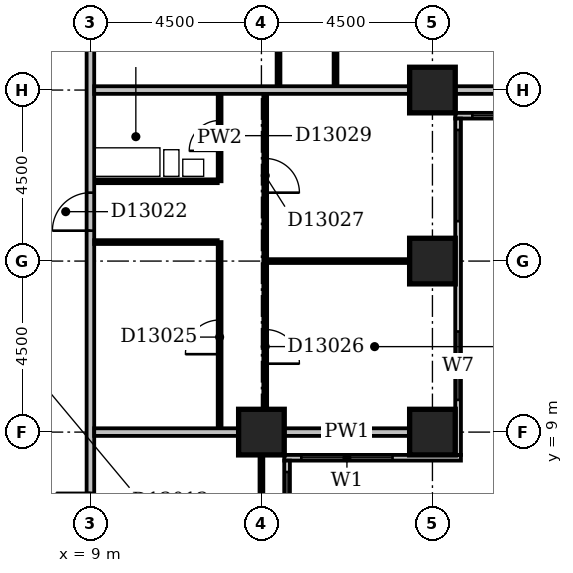
"""IFC4 building model, lengths in metres.
Left out: names, types, materials, properties, quantities, classifications, styles, units other than length and angle.
Written with IfcOpenShell. Run it as: python <this file> out.ifc"""

import sys

from ifc_helpers import new_model, si_unit, direction, frame, frame_2d, origin, origin_2d, place, context, subcontext, project, spatial, rectangle, extrude, element, fill, save


model = new_model("IFC4")
c1 = context("Model", 3, precision=1e-05, world=origin(), true_north=direction((0.0, 1.0)))
c2 = subcontext(c1, "Body", "Model", "MODEL_VIEW")
j1 = project(units=[si_unit("LENGTHUNIT", "METRE"), si_unit("PLANEANGLEUNIT", "RADIAN")], contexts=[c1])
p1 = place(None, origin())
s1 = spatial("IfcSite", under=j1, at=p1, CompositionType="ELEMENT")
p2 = place(p1, origin())
s2 = spatial("IfcBuilding", under=s1, at=p2, CompositionType="ELEMENT")
p3 = place(p2, frame((0.0, 0.0, 57.8)))
s3 = spatial("IfcBuildingStorey", under=s2, at=p3, CompositionType="ELEMENT", Elevation=57.8)
for number, where, z_axis, x_axis in (
    (1, (13.5, 9.0, -0.3), (0.0, 0.0, 1.0), (1.0, 0.0, 0.0)),
    (2, (18.0, 9.0, -0.3), (0.0, 0.0, 1.0), (1.0, 0.0, 0.0)),
    (3, (18.0, 13.5, -0.3), (0.0, 0.0, 1.0), (1.0, 0.0, 0.0)),
    (4, (18.0, 18.0, -0.3), (0.0, 0.0, 1.0), (1.0, 0.0, 0.0)),
):
    element("IfcColumn", number, at=place(p3, frame(where, z_axis=z_axis, x_axis=x_axis)), inside=s3, PredefinedType="COLUMN", context=c2, shape_type="SweptSolid", body=[
        extrude(rectangle(XDim=1.2, YDim=1.2, at=origin_2d()), origin(), (0.0, 0.0, 1.0), 3.6),
    ])
p4 = place(p3, frame((14.175, 3.9, 0.0), z_axis=(0.0, 0.0, 1.0), x_axis=(0.0, 1.0, 0.0)))
e5 = element("IfcWall", 5, at=p4, inside=s3, PredefinedType="STANDARD", context=c2, shape_type="SweptSolid", body=[
    extrude(rectangle(XDim=4.35, YDim=0.15, at=frame_2d((2.175, 0.0))), origin(), (0.0, 0.0, 1.0), 2.7),
])
p5 = place(p4, frame((1.65, 0.0, 0.6)))
e6 = element("IfcOpeningElement", 6, at=p5, cuts=e5, PredefinedType="OPENING", context=c2, shape_type="SweptSolid", body=[
    extrude(rectangle(XDim=2.4, YDim=1.8, at=frame_2d((1.2, 0.9))), frame((0.0, 0.087, 0.0), z_axis=(0.0, -1.0, 0.0), x_axis=(1.0, 0.0, 0.0)), (0.0, 0.0, 1.0), 0.174),
])
p6 = place(p3, frame((14.1, 8.325, 0.0), z_axis=(0.0, 0.0, 1.0), x_axis=(1.0, 0.0, 0.0)))
e7 = element("IfcWall", 7, at=p6, inside=s3, PredefinedType="STANDARD", context=c2, shape_type="SweptSolid", body=[
    extrude(rectangle(XDim=4.65, YDim=0.15, at=frame_2d((2.325, 0.0))), origin(), (0.0, 0.0, 1.0), 2.7),
])
p7 = place(p6, frame((0.45, 0.0, 0.6)))
e8 = element("IfcOpeningElement", 8, at=p7, cuts=e7, PredefinedType="OPENING", context=c2, shape_type="SweptSolid", body=[
    extrude(rectangle(XDim=2.4, YDim=1.8, at=frame_2d((1.2, 0.9))), frame((0.0, 0.087, 0.0), z_axis=(0.0, -1.0, 0.0), x_axis=(1.0, 0.0, 0.0)), (0.0, 0.0, 1.0), 0.174),
])
p8 = place(p3, frame((18.675, 8.4, 0.0), z_axis=(0.0, 0.0, 1.0), x_axis=(0.0, 1.0, 0.0)))
e9 = element("IfcWall", 9, at=p8, inside=s3, PredefinedType="STANDARD", context=c2, shape_type="SweptSolid", body=[
    extrude(rectangle(XDim=8.85, YDim=0.15, at=frame_2d((4.425, 0.0))), origin(), (0.0, 0.0, 1.0), 2.7),
])
p9 = place(p8, frame((1.447, 0.0, 0.6)))
e10 = element("IfcOpeningElement", 10, at=p9, cuts=e9, PredefinedType="OPENING", context=c2, shape_type="SweptSolid", body=[
    extrude(rectangle(XDim=1.8, YDim=1.8, at=frame_2d((0.9, 0.9))), frame((0.0, 0.087, 0.0), z_axis=(0.0, -1.0, 0.0), x_axis=(1.0, 0.0, 0.0)), (0.0, 0.0, 1.0), 0.174),
])
p10 = place(p8, frame((6.15, 0.0, 0.6)))
e11 = element("IfcOpeningElement", 11, at=p10, cuts=e9, PredefinedType="OPENING", context=c2, shape_type="SweptSolid", body=[
    extrude(rectangle(XDim=2.4, YDim=1.8, at=frame_2d((1.2, 0.9))), frame((0.0, 0.087, 0.0), z_axis=(0.0, -1.0, 0.0), x_axis=(1.0, 0.0, 0.0)), (0.0, 0.0, 1.0), 0.174),
])
p11 = place(p3, frame((18.6, 17.325, 0.0), z_axis=(0.0, 0.0, 1.0), x_axis=(1.0, 0.0, 0.0)))
e12 = element("IfcWall", 12, at=p11, inside=s3, PredefinedType="STANDARD", context=c2, shape_type="SweptSolid", body=[
    extrude(rectangle(XDim=4.65, YDim=0.15, at=frame_2d((2.325, 0.0))), origin(), (0.0, 0.0, 1.0), 2.7),
])
p12 = place(p11, frame((0.45, 0.0, 0.6)))
e13 = element("IfcOpeningElement", 13, at=p12, cuts=e12, PredefinedType="OPENING", context=c2, shape_type="SweptSolid", body=[
    extrude(rectangle(XDim=2.4, YDim=1.8, at=frame_2d((1.2, 0.9))), frame((0.0, 0.087, 0.0), z_axis=(0.0, -1.0, 0.0), x_axis=(1.0, 0.0, 0.0)), (0.0, 0.0, 1.0), 0.174),
])
p13 = place(p3, frame((9.0, 5.0, 0.0), z_axis=(0.0, 0.0, 1.0), x_axis=(0.0, 1.0, 0.0)))
e14 = element("IfcWall", 14, at=p13, inside=s3, PredefinedType="PARTITIONING", context=c2, shape_type="SweptSolid", body=[
    extrude(rectangle(XDim=44.5, YDim=0.2, at=frame_2d((22.25, 0.0))), origin(), (0.0, 0.0, 1.0), 3.3),
])
p14 = place(p13, frame((28.05, 0.0, 0.0)))
e15 = element("IfcOpeningElement", 15, at=p14, cuts=e14, PredefinedType="OPENING", context=c2, shape_type="SweptSolid", body=[
    extrude(rectangle(XDim=1.0, YDim=2.1, at=frame_2d((0.5, 1.05))), frame((0.0, 0.112, 0.0), z_axis=(0.0, -1.0, 0.0), x_axis=(1.0, 0.0, 0.0)), (0.0, 0.0, 1.0), 0.224),
])
p15 = place(p13, frame((23.95, 0.0, 0.0)))
e16 = element("IfcOpeningElement", 16, at=p15, cuts=e14, PredefinedType="OPENING", context=c2, shape_type="SweptSolid", body=[
    extrude(rectangle(XDim=1.0, YDim=2.1, at=frame_2d((0.5, 1.05))), frame((0.0, 0.112, 0.0), z_axis=(0.0, -1.0, 0.0), x_axis=(1.0, 0.0, 0.0)), (0.0, 0.0, 1.0), 0.224),
])
p16 = place(p13, frame((18.3, 0.0, 0.0)))
e17 = element("IfcOpeningElement", 17, at=p16, cuts=e14, PredefinedType="OPENING", context=c2, shape_type="SweptSolid", body=[
    extrude(rectangle(XDim=1.0, YDim=2.1, at=frame_2d((0.5, 1.05))), frame((0.0, 0.112, 0.0), z_axis=(0.0, -1.0, 0.0), x_axis=(1.0, 0.0, 0.0)), (0.0, 0.0, 1.0), 0.224),
])
p17 = place(p13, frame((9.3, 0.0, 0.0)))
e18 = element("IfcOpeningElement", 18, at=p17, cuts=e14, PredefinedType="OPENING", context=c2, shape_type="SweptSolid", body=[
    extrude(rectangle(XDim=1.0, YDim=2.1, at=frame_2d((0.5, 1.05))), frame((0.0, 0.112, 0.0), z_axis=(0.0, -1.0, 0.0), x_axis=(1.0, 0.0, 0.0)), (0.0, 0.0, 1.0), 0.224),
])
p18 = place(p13, frame((32.75, 0.0, 0.0)))
e19 = element("IfcOpeningElement", 19, at=p18, cuts=e14, PredefinedType="OPENING", context=c2, shape_type="SweptSolid", body=[
    extrude(rectangle(XDim=0.9, YDim=2.1, at=frame_2d((0.45, 1.05))), frame((0.0, 0.112, 0.0), z_axis=(0.0, -1.0, 0.0), x_axis=(1.0, 0.0, 0.0)), (0.0, 0.0, 1.0), 0.224),
])
p19 = place(p13, frame((1.5, 0.0, 0.0)))
e20 = element("IfcOpeningElement", 20, at=p19, cuts=e14, PredefinedType="OPENING", context=c2, shape_type="SweptSolid", body=[
    extrude(rectangle(XDim=0.9, YDim=2.1, at=frame_2d((0.45, 1.05))), frame((0.0, 0.112, 0.0), z_axis=(0.0, -1.0, 0.0), x_axis=(1.0, 0.0, 0.0)), (0.0, 0.0, 1.0), 0.224),
])
p20 = place(p3, frame((13.5, 5.1, 0.0), z_axis=(0.0, 0.0, 1.0), x_axis=(0.0, 1.0, 0.0)))
e21 = element("IfcWall", 21, at=p20, inside=s3, PredefinedType="PARTITIONING", context=c2, shape_type="SweptSolid", body=[
    extrude(rectangle(XDim=3.3, YDim=0.1, at=frame_2d((1.65, 0.0))), origin(), (0.0, 0.0, 1.0), 2.7),
])
p21 = place(p3, frame((9.1, 9.0, 0.0), z_axis=(0.0, 0.0, 1.0), x_axis=(1.0, 0.0, 0.0)))
e22 = element("IfcWall", 22, at=p21, inside=s3, PredefinedType="PARTITIONING", context=c2, shape_type="SweptSolid", body=[
    extrude(rectangle(XDim=3.8, YDim=0.2, at=frame_2d((1.9, 0.0))), origin(), (0.0, 0.0, 1.0), 3.3),
])
p22 = place(p3, frame((14.1, 9.0, 0.0), z_axis=(0.0, 0.0, 1.0), x_axis=(1.0, 0.0, 0.0)))
e23 = element("IfcWall", 23, at=p22, inside=s3, PredefinedType="PARTITIONING", context=c2, shape_type="SweptSolid", body=[
    extrude(rectangle(XDim=3.3, YDim=0.2, at=frame_2d((1.65, 0.0))), origin(), (0.0, 0.0, 1.0), 2.7),
])
p23 = place(p3, frame((12.4, 9.1, 0.0), z_axis=(0.0, 0.0, 1.0), x_axis=(0.0, 1.0, 0.0)))
e24 = element("IfcWall", 24, at=p23, inside=s3, PredefinedType="PARTITIONING", context=c2, shape_type="SweptSolid", body=[
    extrude(rectangle(XDim=4.9, YDim=0.1, at=frame_2d((2.45, 0.0))), origin(), (0.0, 0.0, 1.0), 3.3),
])
p24 = place(p23, frame((1.95, 0.0, 0.0)))
e25 = element("IfcOpeningElement", 25, at=p24, cuts=e24, PredefinedType="OPENING", context=c2, shape_type="SweptSolid", body=[
    extrude(rectangle(XDim=0.9, YDim=2.1, at=frame_2d((0.45, 1.05))), frame((0.0, 0.062, 0.0), z_axis=(0.0, -1.0, 0.0), x_axis=(1.0, 0.0, 0.0)), (0.0, 0.0, 1.0), 0.124),
])
p25 = place(p3, frame((13.6, 9.6, 0.0), z_axis=(0.0, 0.0, 1.0), x_axis=(0.0, 1.0, 0.0)))
e26 = element("IfcWall", 26, at=p25, inside=s3, PredefinedType="PARTITIONING", context=c2, shape_type="SweptSolid", body=[
    extrude(rectangle(XDim=8.3, YDim=0.1, at=frame_2d((4.15, 0.0))), origin(), (0.0, 0.0, 1.0), 3.3),
])
p26 = place(p25, frame((1.2, 0.0, 0.0)))
e27 = element("IfcOpeningElement", 27, at=p26, cuts=e26, PredefinedType="OPENING", context=c2, shape_type="SweptSolid", body=[
    extrude(rectangle(XDim=0.9, YDim=2.1, at=frame_2d((0.45, 1.05))), frame((0.0, 0.062, 0.0), z_axis=(0.0, -1.0, 0.0), x_axis=(1.0, 0.0, 0.0)), (0.0, 0.0, 1.0), 0.124),
])
p27 = place(p25, frame((5.7, 0.0, 0.0)))
e28 = element("IfcOpeningElement", 28, at=p27, cuts=e26, PredefinedType="OPENING", context=c2, shape_type="SweptSolid", body=[
    extrude(rectangle(XDim=0.9, YDim=2.1, at=frame_2d((0.45, 1.05))), frame((0.0, 0.062, 0.0), z_axis=(0.0, -1.0, 0.0), x_axis=(1.0, 0.0, 0.0)), (0.0, 0.0, 1.0), 0.124),
])
p28 = place(p3, frame((13.65, 13.5, 0.0), z_axis=(0.0, 0.0, 1.0), x_axis=(1.0, 0.0, 0.0)))
e29 = element("IfcWall", 29, at=p28, inside=s3, PredefinedType="PARTITIONING", context=c2, shape_type="SweptSolid", body=[
    extrude(rectangle(XDim=3.75, YDim=0.1, at=frame_2d((1.875, 0.0))), origin(), (0.0, 0.0, 1.0), 3.3),
])
p29 = place(p3, frame((9.1, 14.0, 0.0), z_axis=(0.0, 0.0, 1.0), x_axis=(1.0, 0.0, 0.0)))
e30 = element("IfcWall", 30, at=p29, inside=s3, PredefinedType="PARTITIONING", context=c2, shape_type="SweptSolid", body=[
    extrude(rectangle(XDim=3.25, YDim=0.1, at=frame_2d((1.625, 0.0))), origin(), (0.0, 0.0, 1.0), 3.3),
])
p30 = place(p3, frame((9.1, 15.6, 0.0), z_axis=(0.0, 0.0, 1.0), x_axis=(1.0, 0.0, 0.0)))
e31 = element("IfcWall", 31, at=p30, inside=s3, PredefinedType="PLUMBINGWALL", context=c2, shape_type="SweptSolid", body=[
    extrude(rectangle(XDim=3.25, YDim=0.1, at=frame_2d((1.625, 0.0))), origin(), (0.0, 0.0, 1.0), 3.3),
])
p31 = place(p3, frame((12.4, 15.6, 0.0), z_axis=(0.0, 0.0, 1.0), x_axis=(0.0, 1.0, 0.0)))
e32 = element("IfcWall", 32, at=p31, inside=s3, PredefinedType="PARTITIONING", context=c2, shape_type="SweptSolid", body=[
    extrude(rectangle(XDim=2.3, YDim=0.1, at=frame_2d((1.15, 0.0))), origin(), (0.0, 0.0, 1.0), 3.3),
])
p32 = place(p31, frame((0.8, 0.0, 0.0)))
e33 = element("IfcOpeningElement", 33, at=p32, cuts=e32, PredefinedType="OPENING", context=c2, shape_type="SweptSolid", body=[
    extrude(rectangle(XDim=0.8, YDim=2.1, at=frame_2d((0.4, 1.05))), frame((0.0, 0.062, 0.0), z_axis=(0.0, -1.0, 0.0), x_axis=(1.0, 0.0, 0.0)), (0.0, 0.0, 1.0), 0.124),
])
p33 = place(p3, frame((9.1, 18.0, 0.0), z_axis=(0.0, 0.0, 1.0), x_axis=(1.0, 0.0, 0.0)))
e34 = element("IfcWall", 34, at=p33, inside=s3, PredefinedType="PARTITIONING", context=c2, shape_type="SweptSolid", body=[
    extrude(rectangle(XDim=8.3, YDim=0.2, at=frame_2d((4.15, 0.0))), origin(), (0.0, 0.0, 1.0), 2.6),
])
p34 = place(p3, frame((18.6, 18.0, 0.0), z_axis=(0.0, 0.0, 1.0), x_axis=(1.0, 0.0, 0.0)))
e35 = element("IfcWall", 35, at=p34, inside=s3, PredefinedType="PARTITIONING", context=c2, shape_type="SweptSolid", body=[
    extrude(rectangle(XDim=3.3, YDim=0.2, at=frame_2d((1.65, 0.0))), origin(), (0.0, 0.0, 1.0), 2.7),
])
p35 = place(p3, frame((13.95, 18.1, 0.0), z_axis=(0.0, 0.0, 1.0), x_axis=(0.0, 1.0, 0.0)))
e36 = element("IfcWall", 36, at=p35, inside=s3, PredefinedType="PARTITIONING", context=c2, shape_type="SweptSolid", body=[
    extrude(rectangle(XDim=4.9, YDim=0.1, at=frame_2d((2.45, 0.0))), origin(), (0.0, 0.0, 1.0), 3.3),
])
p36 = place(p35, frame((1.95, 0.0, 0.0)))
e37 = element("IfcOpeningElement", 37, at=p36, cuts=e36, PredefinedType="OPENING", context=c2, shape_type="SweptSolid", body=[
    extrude(rectangle(XDim=0.9, YDim=2.1, at=frame_2d((0.45, 1.05))), frame((0.0, 0.062, 0.0), z_axis=(0.0, -1.0, 0.0), x_axis=(1.0, 0.0, 0.0)), (0.0, 0.0, 1.0), 0.124),
])
p37 = place(p3, frame((15.45, 18.1, 0.0), z_axis=(0.0, 0.0, 1.0), x_axis=(0.0, 1.0, 0.0)))
e38 = element("IfcWall", 38, at=p37, inside=s3, PredefinedType="PARTITIONING", context=c2, shape_type="SweptSolid", body=[
    extrude(rectangle(XDim=8.8, YDim=0.1, at=frame_2d((4.4, 0.0))), origin(), (0.0, 0.0, 1.0), 3.3),
])
p38 = place(p37, frame((1.7, 0.0, 0.0)))
e39 = element("IfcOpeningElement", 39, at=p38, cuts=e38, PredefinedType="OPENING", context=c2, shape_type="SweptSolid", body=[
    extrude(rectangle(XDim=0.9, YDim=2.1, at=frame_2d((0.45, 1.05))), frame((0.0, 0.062, 0.0), z_axis=(0.0, -1.0, 0.0), x_axis=(1.0, 0.0, 0.0)), (0.0, 0.0, 1.0), 0.124),
])
p39 = place(p37, frame((5.05, 0.0, 0.0)))
e40 = element("IfcOpeningElement", 40, at=p39, cuts=e38, PredefinedType="OPENING", context=c2, shape_type="SweptSolid", body=[
    extrude(rectangle(XDim=0.9, YDim=2.1, at=frame_2d((0.45, 1.05))), frame((0.0, 0.062, 0.0), z_axis=(0.0, -1.0, 0.0), x_axis=(1.0, 0.0, 0.0)), (0.0, 0.0, 1.0), 0.124),
])
p40 = place(p5, origin())
e41 = element("IfcWindow", 41, at=p40, inside=s3, PartitioningType="SINGLE_PANEL", PredefinedType="WINDOW", context=c2, shape_type="SweptSolid", body=[
    extrude(rectangle(XDim=2.4, YDim=1.8, at=frame_2d((1.2, 0.9))), frame((0.0, 0.03, 0.0), z_axis=(0.0, -1.0, 0.0), x_axis=(1.0, 0.0, 0.0)), (0.0, 0.0, 1.0), 0.06),
])
fill(e6, e41)
p41 = place(p7, origin())
e42 = element("IfcWindow", 42, at=p41, inside=s3, PartitioningType="SINGLE_PANEL", PredefinedType="WINDOW", context=c2, shape_type="SweptSolid", body=[
    extrude(rectangle(XDim=2.4, YDim=1.8, at=frame_2d((1.2, 0.9))), frame((0.0, 0.03, 0.0), z_axis=(0.0, -1.0, 0.0), x_axis=(1.0, 0.0, 0.0)), (0.0, 0.0, 1.0), 0.06),
])
fill(e8, e42)
p42 = place(p9, origin())
e43 = element("IfcWindow", 43, at=p42, inside=s3, PartitioningType="SINGLE_PANEL", PredefinedType="WINDOW", context=c2, shape_type="SweptSolid", body=[
    extrude(rectangle(XDim=1.8, YDim=1.8, at=frame_2d((0.9, 0.9))), frame((0.0, 0.03, 0.0), z_axis=(0.0, -1.0, 0.0), x_axis=(1.0, 0.0, 0.0)), (0.0, 0.0, 1.0), 0.06),
])
fill(e10, e43)
p43 = place(p10, origin())
e44 = element("IfcWindow", 44, at=p43, inside=s3, PartitioningType="SINGLE_PANEL", PredefinedType="WINDOW", context=c2, shape_type="SweptSolid", body=[
    extrude(rectangle(XDim=2.4, YDim=1.8, at=frame_2d((1.2, 0.9))), frame((0.0, 0.03, 0.0), z_axis=(0.0, -1.0, 0.0), x_axis=(1.0, 0.0, 0.0)), (0.0, 0.0, 1.0), 0.06),
])
fill(e11, e44)
p44 = place(p12, origin())
e45 = element("IfcWindow", 45, at=p44, inside=s3, PartitioningType="SINGLE_PANEL", PredefinedType="WINDOW", context=c2, shape_type="SweptSolid", body=[
    extrude(rectangle(XDim=2.4, YDim=1.8, at=frame_2d((1.2, 0.9))), frame((0.0, 0.03, 0.0), z_axis=(0.0, -1.0, 0.0), x_axis=(1.0, 0.0, 0.0)), (0.0, 0.0, 1.0), 0.06),
])
fill(e13, e45)
p45 = place(p17, origin())
e46 = element("IfcDoor", 46, at=p45, inside=s3, OperationType="SINGLE_SWING_LEFT", PredefinedType="DOOR", context=c2, shape_type="SweptSolid", body=[
    extrude(rectangle(XDim=1.0, YDim=2.1, at=frame_2d((0.5, 1.05))), frame((0.0, 0.025, 0.0), z_axis=(0.0, -1.0, 0.0), x_axis=(1.0, 0.0, 0.0)), (0.0, 0.0, 1.0), 0.05),
])
fill(e18, e46)
p46 = place(p24, origin())
e47 = element("IfcDoor", 47, at=p46, inside=s3, OperationType="SINGLE_SWING_LEFT", PredefinedType="DOOR", context=c2, shape_type="SweptSolid", body=[
    extrude(rectangle(XDim=0.9, YDim=2.1, at=frame_2d((0.45, 1.05))), frame((0.0, 0.025, 0.0), z_axis=(0.0, -1.0, 0.0), x_axis=(1.0, 0.0, 0.0)), (0.0, 0.0, 1.0), 0.05),
])
fill(e25, e47)
p47 = place(p26, frame((0.9, 0.0, 0.0), z_axis=(0.0, 0.0, 1.0), x_axis=(-1.0, 0.0, 0.0)))
e48 = element("IfcDoor", 48, at=p47, inside=s3, OperationType="SINGLE_SWING_RIGHT", PredefinedType="DOOR", context=c2, shape_type="SweptSolid", body=[
    extrude(rectangle(XDim=0.9, YDim=2.1, at=frame_2d((0.45, 1.05))), frame((0.0, 0.025, 0.0), z_axis=(0.0, -1.0, 0.0), x_axis=(1.0, 0.0, 0.0)), (0.0, 0.0, 1.0), 0.05),
])
fill(e27, e48)
p48 = place(p27, frame((0.9, 0.0, 0.0), z_axis=(0.0, 0.0, 1.0), x_axis=(-1.0, 0.0, 0.0)))
e49 = element("IfcDoor", 49, at=p48, inside=s3, OperationType="SINGLE_SWING_RIGHT", PredefinedType="DOOR", context=c2, shape_type="SweptSolid", body=[
    extrude(rectangle(XDim=0.9, YDim=2.1, at=frame_2d((0.45, 1.05))), frame((0.0, 0.025, 0.0), z_axis=(0.0, -1.0, 0.0), x_axis=(1.0, 0.0, 0.0)), (0.0, 0.0, 1.0), 0.05),
])
fill(e28, e49)
p49 = place(p32, origin())
e50 = element("IfcDoor", 50, at=p49, inside=s3, OperationType="SINGLE_SWING_LEFT", PredefinedType="DOOR", context=c2, shape_type="SweptSolid", body=[
    extrude(rectangle(XDim=0.8, YDim=2.1, at=frame_2d((0.4, 1.05))), frame((0.0, 0.025, 0.0), z_axis=(0.0, -1.0, 0.0), x_axis=(1.0, 0.0, 0.0)), (0.0, 0.0, 1.0), 0.05),
])
fill(e33, e50)
save(model, sys.argv[1])
